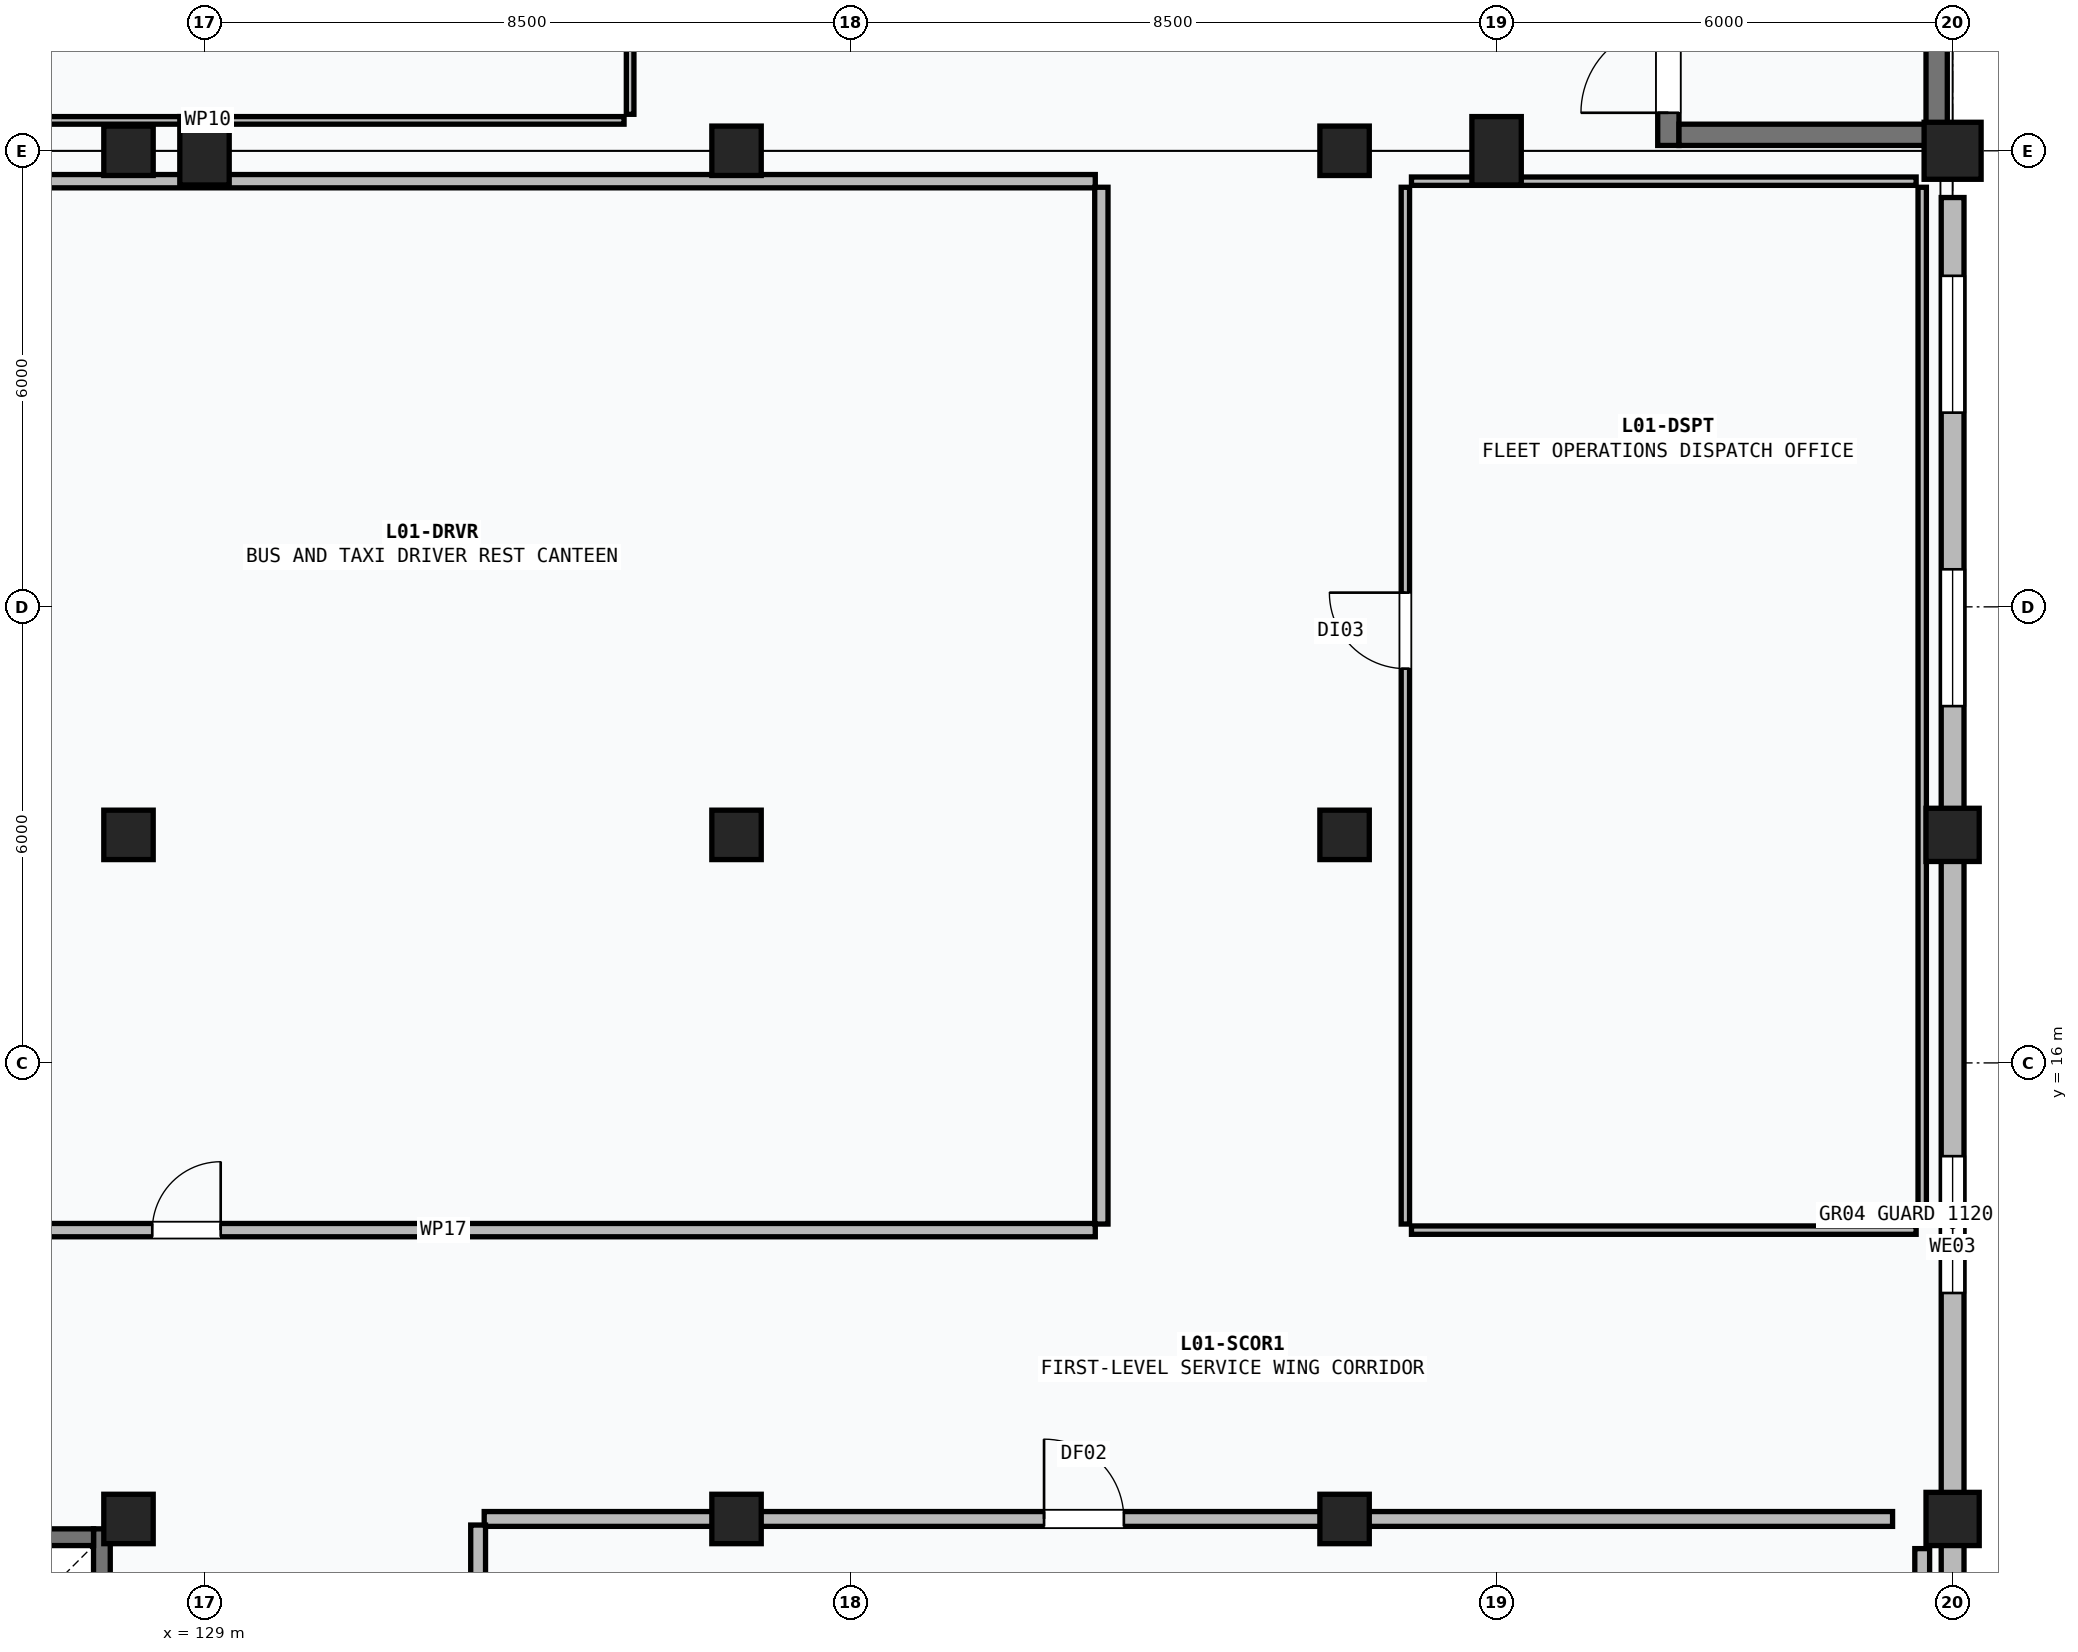
"""IFC4 building model, lengths in metres.
Left out: names, types, materials, properties, quantities, classifications, styles, units other than length and angle.
Written with IfcOpenShell. Run it as: python <this file> out.ifc"""

import sys

from ifc_helpers import new_model, si_unit, direction, frame, frame_2d, origin, origin_2d, place, context, subcontext, project, spatial, rectangle, extrude, element, fill, save


model = new_model("IFC4")
c1 = context("Model", 3, precision=1e-05, world=origin(), true_north=direction((0.0, 1.0)))
c2 = subcontext(c1, "Body", "Model", "MODEL_VIEW")
j1 = project(units=[si_unit("LENGTHUNIT", "METRE"), si_unit("PLANEANGLEUNIT", "RADIAN")], contexts=[c1])
p1 = place(None, origin())
s1 = spatial("IfcSite", under=j1, at=p1, CompositionType="ELEMENT")
p2 = place(p1, origin())
s2 = spatial("IfcBuilding", under=s1, at=p2, CompositionType="ELEMENT")
p3 = place(p2, frame((0.0, 0.0, 4.5)))
s3 = spatial("IfcBuildingStorey", under=s2, at=p3, CompositionType="ELEMENT", Elevation=4.5)
for number, where, z_axis, x_axis in (
    (1, (129.0, 28.0, 0.0), (0.0, 0.0, 1.0), (1.0, 0.0, 0.0)),
    (2, (146.0, 28.0, 0.0), (0.0, 0.0, 1.0), (1.0, 0.0, 0.0)),
):
    element("IfcColumn", number, at=place(p3, frame(where, z_axis=z_axis, x_axis=x_axis)), inside=s3, PredefinedType="COLUMN", context=c2, shape_type="SweptSolid", body=[
        extrude(rectangle(XDim=0.65, YDim=0.9, at=origin_2d()), origin(), (0.0, 0.0, 1.0), 3.9),
    ])
p4 = place(p3, frame((152.0, 28.0, 0.0), z_axis=(0.0, 0.0, 1.0), x_axis=(1.0, 0.0, 0.0)))
e3 = element("IfcColumn", 3, at=p4, inside=s3, PredefinedType="COLUMN", context=c2, shape_type="SweptSolid", body=[
    extrude(rectangle(XDim=0.75, YDim=0.75, at=origin_2d()), origin(), (0.0, 0.0, 1.0), 3.9),
])
for number, where, z_axis, x_axis in (
    (4, (128.0, 10.0, 0.0), (0.0, 0.0, 1.0), (1.0, 0.0, 0.0)),
    (5, (128.0, 19.0, 0.0), (0.0, 0.0, 1.0), (1.0, 0.0, 0.0)),
    (6, (128.0, 28.0, 0.0), (0.0, 0.0, 1.0), (1.0, 0.0, 0.0)),
    (7, (136.0, 10.0, 0.0), (0.0, 0.0, 1.0), (1.0, 0.0, 0.0)),
    (8, (136.0, 19.0, 0.0), (0.0, 0.0, 1.0), (1.0, 0.0, 0.0)),
    (9, (136.0, 28.0, 0.0), (0.0, 0.0, 1.0), (1.0, 0.0, 0.0)),
    (10, (144.0, 10.0, 0.0), (0.0, 0.0, 1.0), (1.0, 0.0, 0.0)),
    (11, (144.0, 19.0, 0.0), (0.0, 0.0, 1.0), (1.0, 0.0, 0.0)),
    (12, (144.0, 28.0, 0.0), (0.0, 0.0, 1.0), (1.0, 0.0, 0.0)),
):
    element("IfcColumn", number, at=place(p3, frame(where, z_axis=z_axis, x_axis=x_axis)), inside=s3, PredefinedType="COLUMN", context=c2, shape_type="SweptSolid", body=[
        extrude(rectangle(XDim=0.65, YDim=0.65, at=origin_2d()), origin(), (0.0, 0.0, 1.0), 3.9),
    ])
for number, where, z_axis, x_axis in (
    (13, (152.0, 10.0, 0.0), (0.0, 0.0, 1.0), (1.0, 0.0, 0.0)),
    (14, (152.0, 19.0, 0.0), (0.0, 0.0, 1.0), (1.0, 0.0, 0.0)),
):
    element("IfcColumn", number, at=place(p3, frame(where, z_axis=z_axis, x_axis=x_axis)), inside=s3, PredefinedType="COLUMN", context=c2, shape_type="SweptSolid", body=[
        extrude(rectangle(XDim=0.7, YDim=0.7, at=origin_2d()), origin(), (0.0, 0.0, 1.0), 3.9),
    ])
p5 = place(p3, frame((152.0, 0.36, 0.0), z_axis=(0.0, 0.0, 1.0), x_axis=(0.0, 1.0, 0.0)))
e15 = element("IfcWall", 15, at=p5, inside=s3, PredefinedType="SOLIDWALL", context=c2, shape_type="SweptSolid", body=[
    extrude(rectangle(XDim=27.025, YDim=0.3, at=frame_2d((13.512, 0.0))), origin(), (0.0, 0.0, 1.0), 2.695),
])
p6 = place(p5, frame((1.03, 0.0, 0.695)))
e16 = element("IfcOpeningElement", 16, at=p6, cuts=e15, PredefinedType="OPENING", context=c2, shape_type="SweptSolid", body=[
    extrude(rectangle(XDim=1.8, YDim=1.8, at=frame_2d((0.9, 0.9))), frame((0.0, 0.16, 0.0), z_axis=(0.0, -1.0, 0.0), x_axis=(1.0, 0.0, 0.0)), (0.0, 0.0, 1.0), 0.32),
])
p7 = place(p5, frame((4.891, 0.0, 0.695)))
e17 = element("IfcOpeningElement", 17, at=p7, cuts=e15, PredefinedType="OPENING", context=c2, shape_type="SweptSolid", body=[
    extrude(rectangle(XDim=1.8, YDim=1.8, at=frame_2d((0.9, 0.9))), frame((0.0, 0.16, 0.0), z_axis=(0.0, -1.0, 0.0), x_axis=(1.0, 0.0, 0.0)), (0.0, 0.0, 1.0), 0.32),
])
p8 = place(p5, frame((12.613, 0.0, 0.695)))
e18 = element("IfcOpeningElement", 18, at=p8, cuts=e15, PredefinedType="OPENING", context=c2, shape_type="SweptSolid", body=[
    extrude(rectangle(XDim=1.8, YDim=1.8, at=frame_2d((0.9, 0.9))), frame((0.0, 0.16, 0.0), z_axis=(0.0, -1.0, 0.0), x_axis=(1.0, 0.0, 0.0)), (0.0, 0.0, 1.0), 0.32),
])
p9 = place(p5, frame((20.334, 0.0, 0.695)))
e19 = element("IfcOpeningElement", 19, at=p9, cuts=e15, PredefinedType="OPENING", context=c2, shape_type="SweptSolid", body=[
    extrude(rectangle(XDim=1.8, YDim=1.8, at=frame_2d((0.9, 0.9))), frame((0.0, 0.16, 0.0), z_axis=(0.0, -1.0, 0.0), x_axis=(1.0, 0.0, 0.0)), (0.0, 0.0, 1.0), 0.32),
])
p10 = place(p5, frame((24.195, 0.0, 0.695)))
e20 = element("IfcOpeningElement", 20, at=p10, cuts=e15, PredefinedType="OPENING", context=c2, shape_type="SweptSolid", body=[
    extrude(rectangle(XDim=1.8, YDim=1.8, at=frame_2d((0.9, 0.9))), frame((0.0, 0.16, 0.0), z_axis=(0.0, -1.0, 0.0), x_axis=(1.0, 0.0, 0.0)), (0.0, 0.0, 1.0), 0.32),
])
p11 = place(p3, frame((148.26, 28.07, 0.0), z_axis=(0.0, 0.0, 1.0), x_axis=(0.0, 1.0, 0.0)))
e21 = element("IfcWall", 21, at=p11, inside=s3, PredefinedType="SHEAR", context=c2, shape_type="SweptSolid", body=[
    extrude(rectangle(XDim=9.86, YDim=0.28, at=frame_2d((4.93, 0.0))), origin(), (0.0, 0.0, 1.0), 3.9),
])
p12 = place(p11, frame((0.43, 0.0, 0.0)))
e22 = element("IfcOpeningElement", 22, at=p12, cuts=e21, PredefinedType="OPENING", context=c2, shape_type="SweptSolid", body=[
    extrude(rectangle(XDim=1.15, YDim=2.15, at=frame_2d((0.575, 1.075))), frame((0.0, 0.15, 0.0), z_axis=(0.0, -1.0, 0.0), x_axis=(1.0, 0.0, 0.0)), (0.0, 0.0, 1.0), 0.3),
])
p13 = place(p3, frame((151.79, 37.93, 0.0), z_axis=(0.0, 0.0, 1.0), x_axis=(0.0, -1.0, 0.0)))
e23 = element("IfcWall", 23, at=p13, inside=s3, PredefinedType="SHEAR", context=c2, shape_type="SweptSolid", body=[
    extrude(rectangle(XDim=9.86, YDim=0.28, at=frame_2d((4.93, 0.0))), origin(), (0.0, 0.0, 1.0), 3.9),
])
p14 = place(p3, frame((151.65, 28.21, 0.0), z_axis=(0.0, 0.0, 1.0), x_axis=(-1.0, 0.0, 0.0)))
e24 = element("IfcWall", 24, at=p14, inside=s3, PredefinedType="SHEAR", context=c2, shape_type="SweptSolid", body=[
    extrude(rectangle(XDim=3.25, YDim=0.28, at=frame_2d((1.625, 0.0))), origin(), (0.0, 0.0, 1.0), 3.9),
])
p15 = place(p3, frame((127.65, 9.87, 0.0), z_axis=(0.0, 0.0, 1.0), x_axis=(0.0, -1.0, 0.0)))
e25 = element("IfcWall", 25, at=p15, inside=s3, PredefinedType="SHEAR", context=c2, shape_type="SweptSolid", body=[
    extrude(rectangle(XDim=3.81, YDim=0.22, at=frame_2d((1.905, 0.0))), origin(), (0.0, 0.0, 1.0), 3.9),
])
p16 = place(p15, frame((1.205, 0.0, 0.0)))
e26 = element("IfcOpeningElement", 26, at=p16, cuts=e25, PredefinedType="OPENING", context=c2, shape_type="SweptSolid", body=[
    extrude(rectangle(XDim=1.4, YDim=2.3, at=frame_2d((0.7, 1.15))), frame((0.0, 0.12, 0.0), z_axis=(0.0, -1.0, 0.0), x_axis=(1.0, 0.0, 0.0)), (0.0, 0.0, 1.0), 0.24),
])
p17 = place(p3, frame((123.94, 9.76, 0.0), z_axis=(0.0, 0.0, 1.0), x_axis=(1.0, 0.0, 0.0)))
e27 = element("IfcWall", 27, at=p17, inside=s3, PredefinedType="SHEAR", context=c2, shape_type="SweptSolid", body=[
    extrude(rectangle(XDim=3.6, YDim=0.22, at=frame_2d((1.8, 0.0))), origin(), (0.0, 0.0, 1.0), 3.9),
])
p18 = place(p3, frame((112.89, 28.4, 0.0), z_axis=(0.0, 0.0, 1.0), x_axis=(1.0, 0.0, 0.0)))
e28 = element("IfcWall", 28, at=p18, inside=s3, PredefinedType="PARTITIONING", context=c2, shape_type="SweptSolid", body=[
    extrude(rectangle(XDim=21.63, YDim=0.1, at=frame_2d((10.815, 0.0))), origin(), (0.0, 0.0, 1.0), 2.695),
])
p19 = place(p3, frame((134.6, 28.48, 0.0), z_axis=(0.0, 0.0, 1.0), x_axis=(0.0, 1.0, 0.0)))
e29 = element("IfcWall", 29, at=p19, inside=s3, PredefinedType="PARTITIONING", context=c2, shape_type="SweptSolid", body=[
    extrude(rectangle(XDim=9.44, YDim=0.1, at=frame_2d((4.72, 0.0))), origin(), (0.0, 0.0, 1.0), 3.645),
])
p20 = place(p19, frame((3.995, 0.0, 0.0)))
e30 = element("IfcOpeningElement", 30, at=p20, cuts=e29, PredefinedType="OPENING", context=c2, shape_type="SweptSolid", body=[
    extrude(rectangle(XDim=1.45, YDim=2.2, at=frame_2d((0.725, 1.1))), frame((0.0, 0.06, 0.0), z_axis=(0.0, -1.0, 0.0), x_axis=(1.0, 0.0, 0.0)), (0.0, 0.0, 1.0), 0.12),
])
p21 = place(p3, frame((112.48, 13.8, 0.0), z_axis=(0.0, 0.0, 1.0), x_axis=(1.0, 0.0, 0.0)))
e31 = element("IfcWall", 31, at=p21, inside=s3, PredefinedType="PARTITIONING", context=c2, shape_type="SweptSolid", body=[
    extrude(rectangle(XDim=28.24, YDim=0.175, at=frame_2d((14.12, 0.0))), origin(), (0.0, 0.0, 1.0), 3.045),
])
p22 = place(p21, frame((15.833, 0.0, 0.0)))
e32 = element("IfcOpeningElement", 32, at=p22, cuts=e31, PredefinedType="OPENING", context=c2, shape_type="SweptSolid", body=[
    extrude(rectangle(XDim=0.9, YDim=2.1, at=frame_2d((0.45, 1.05))), frame((0.0, 0.098, 0.0), z_axis=(0.0, -1.0, 0.0), x_axis=(1.0, 0.0, 0.0)), (0.0, 0.0, 1.0), 0.195),
])
p23 = place(p3, frame((112.89, 27.6, 0.0), z_axis=(0.0, 0.0, 1.0), x_axis=(1.0, 0.0, 0.0)))
e33 = element("IfcWall", 33, at=p23, inside=s3, PredefinedType="PARTITIONING", context=c2, shape_type="SweptSolid", body=[
    extrude(rectangle(XDim=27.83, YDim=0.175, at=frame_2d((13.915, 0.0))), origin(), (0.0, 0.0, 1.0), 2.745),
])
p24 = place(p3, frame((140.8, 13.88, 0.0), z_axis=(0.0, 0.0, 1.0), x_axis=(0.0, 1.0, 0.0)))
e34 = element("IfcWall", 34, at=p24, inside=s3, PredefinedType="PARTITIONING", context=c2, shape_type="SweptSolid", body=[
    extrude(rectangle(XDim=13.64, YDim=0.175, at=frame_2d((6.82, 0.0))), origin(), (0.0, 0.0, 1.0), 2.745),
])
p25 = place(p3, frame((132.68, 10.0, 0.0), z_axis=(0.0, 0.0, 1.0), x_axis=(1.0, 0.0, 0.0)))
e35 = element("IfcWall", 35, at=p25, inside=s3, PredefinedType="PARTITIONING", context=c2, shape_type="SweptSolid", body=[
    extrude(rectangle(XDim=18.53, YDim=0.195, at=frame_2d((9.265, 0.0))), origin(), (0.0, 0.0, 1.0), 2.545),
])
p26 = place(p25, frame((7.366, 0.0, 0.0)))
e36 = element("IfcOpeningElement", 36, at=p26, cuts=e35, PredefinedType="OPENING", context=c2, shape_type="SweptSolid", body=[
    extrude(rectangle(XDim=1.05, YDim=2.15, at=frame_2d((0.525, 1.075))), frame((0.0, 0.107, 0.0), z_axis=(0.0, -1.0, 0.0), x_axis=(1.0, 0.0, 0.0)), (0.0, 0.0, 1.0), 0.215),
])
p27 = place(p3, frame((132.6, 0.48, 0.0), z_axis=(0.0, 0.0, 1.0), x_axis=(0.0, 1.0, 0.0)))
e37 = element("IfcWall", 37, at=p27, inside=s3, PredefinedType="PARTITIONING", context=c2, shape_type="SweptSolid", body=[
    extrude(rectangle(XDim=9.44, YDim=0.195, at=frame_2d((4.72, 0.0))), origin(), (0.0, 0.0, 1.0), 2.545),
])
p28 = place(p3, frame((151.6, 0.48, 0.0), z_axis=(0.0, 0.0, 1.0), x_axis=(0.0, 1.0, 0.0)))
e38 = element("IfcWall", 38, at=p28, inside=s3, PredefinedType="PARTITIONING", context=c2, shape_type="SweptSolid", body=[
    extrude(rectangle(XDim=9.13, YDim=0.195, at=frame_2d((4.565, 0.0))), origin(), (0.0, 0.0, 1.0), 3.645),
])
p29 = place(p3, frame((144.88, 13.8, 0.0), z_axis=(0.0, 0.0, 1.0), x_axis=(1.0, 0.0, 0.0)))
e39 = element("IfcWall", 39, at=p29, inside=s3, PredefinedType="PARTITIONING", context=c2, shape_type="SweptSolid", body=[
    extrude(rectangle(XDim=6.64, YDim=0.11, at=frame_2d((3.32, 0.0))), origin(), (0.0, 0.0, 1.0), 3.645),
])
p30 = place(p3, frame((144.88, 27.6, 0.0), z_axis=(0.0, 0.0, 1.0), x_axis=(1.0, 0.0, 0.0)))
e40 = element("IfcWall", 40, at=p30, inside=s3, PredefinedType="PARTITIONING", context=c2, shape_type="SweptSolid", body=[
    extrude(rectangle(XDim=6.64, YDim=0.11, at=frame_2d((3.32, 0.0))), origin(), (0.0, 0.0, 1.0), 2.745),
])
p31 = place(p3, frame((144.8, 13.88, 0.0), z_axis=(0.0, 0.0, 1.0), x_axis=(0.0, 1.0, 0.0)))
e41 = element("IfcWall", 41, at=p31, inside=s3, PredefinedType="PARTITIONING", context=c2, shape_type="SweptSolid", body=[
    extrude(rectangle(XDim=13.64, YDim=0.11, at=frame_2d((6.82, 0.0))), origin(), (0.0, 0.0, 1.0), 2.845),
])
p32 = place(p31, frame((7.307, 0.0, 0.0)))
e42 = element("IfcOpeningElement", 42, at=p32, cuts=e41, PredefinedType="OPENING", context=c2, shape_type="SweptSolid", body=[
    extrude(rectangle(XDim=1.0, YDim=2.1, at=frame_2d((0.5, 1.05))), frame((0.0, 0.065, 0.0), z_axis=(0.0, -1.0, 0.0), x_axis=(1.0, 0.0, 0.0)), (0.0, 0.0, 1.0), 0.13),
])
p33 = place(p3, frame((151.6, 13.88, 0.0), z_axis=(0.0, 0.0, 1.0), x_axis=(0.0, 1.0, 0.0)))
e43 = element("IfcWall", 43, at=p33, inside=s3, PredefinedType="PARTITIONING", context=c2, shape_type="SweptSolid", body=[
    extrude(rectangle(XDim=13.64, YDim=0.11, at=frame_2d((6.82, 0.0))), origin(), (0.0, 0.0, 1.0), 2.845),
])
p34 = place(p8, origin())
e44 = element("IfcWindow", 44, at=p34, inside=s3, PartitioningType="SINGLE_PANEL", PredefinedType="WINDOW", context=c2, shape_type="SweptSolid", body=[
    extrude(rectangle(XDim=1.8, YDim=1.8, at=frame_2d((0.9, 0.9))), frame((0.0, 0.03, 0.0), z_axis=(0.0, -1.0, 0.0), x_axis=(1.0, 0.0, 0.0)), (0.0, 0.0, 1.0), 0.06),
])
fill(e18, e44)
p35 = place(p9, origin())
e45 = element("IfcWindow", 45, at=p35, inside=s3, PartitioningType="SINGLE_PANEL", PredefinedType="WINDOW", context=c2, shape_type="SweptSolid", body=[
    extrude(rectangle(XDim=1.8, YDim=1.8, at=frame_2d((0.9, 0.9))), frame((0.0, 0.03, 0.0), z_axis=(0.0, -1.0, 0.0), x_axis=(1.0, 0.0, 0.0)), (0.0, 0.0, 1.0), 0.06),
])
fill(e19, e45)
p36 = place(p10, origin())
e46 = element("IfcWindow", 46, at=p36, inside=s3, PartitioningType="SINGLE_PANEL", PredefinedType="WINDOW", context=c2, shape_type="SweptSolid", body=[
    extrude(rectangle(XDim=1.8, YDim=1.8, at=frame_2d((0.9, 0.9))), frame((0.0, 0.03, 0.0), z_axis=(0.0, -1.0, 0.0), x_axis=(1.0, 0.0, 0.0)), (0.0, 0.0, 1.0), 0.06),
])
fill(e20, e46)
p37 = place(p12, origin())
e47 = element("IfcDoor", 47, at=p37, inside=s3, OperationType="SINGLE_SWING_LEFT", PredefinedType="DOOR", context=c2, shape_type="SweptSolid", body=[
    extrude(rectangle(XDim=1.15, YDim=2.15, at=frame_2d((0.575, 1.075))), frame((0.0, 0.025, 0.0), z_axis=(0.0, -1.0, 0.0), x_axis=(1.0, 0.0, 0.0)), (0.0, 0.0, 1.0), 0.05),
])
fill(e22, e47)
p38 = place(p22, origin())
e48 = element("IfcDoor", 48, at=p38, inside=s3, OperationType="SINGLE_SWING_RIGHT", PredefinedType="DOOR", context=c2, shape_type="SweptSolid", body=[
    extrude(rectangle(XDim=0.9, YDim=2.1, at=frame_2d((0.45, 1.05))), frame((0.0, 0.025, 0.0), z_axis=(0.0, -1.0, 0.0), x_axis=(1.0, 0.0, 0.0)), (0.0, 0.0, 1.0), 0.05),
])
fill(e32, e48)
p39 = place(p26, origin())
e49 = element("IfcDoor", 49, at=p39, inside=s3, OperationType="SINGLE_SWING_LEFT", PredefinedType="DOOR", context=c2, shape_type="SweptSolid", body=[
    extrude(rectangle(XDim=1.05, YDim=2.15, at=frame_2d((0.525, 1.075))), frame((0.0, 0.025, 0.0), z_axis=(0.0, -1.0, 0.0), x_axis=(1.0, 0.0, 0.0)), (0.0, 0.0, 1.0), 0.05),
])
fill(e36, e49)
p40 = place(p32, origin())
e50 = element("IfcDoor", 50, at=p40, inside=s3, OperationType="SINGLE_SWING_RIGHT", PredefinedType="DOOR", context=c2, shape_type="SweptSolid", body=[
    extrude(rectangle(XDim=1.0, YDim=2.1, at=frame_2d((0.5, 1.05))), frame((0.0, 0.025, 0.0), z_axis=(0.0, -1.0, 0.0), x_axis=(1.0, 0.0, 0.0)), (0.0, 0.0, 1.0), 0.05),
])
fill(e42, e50)
save(model, sys.argv[1])
